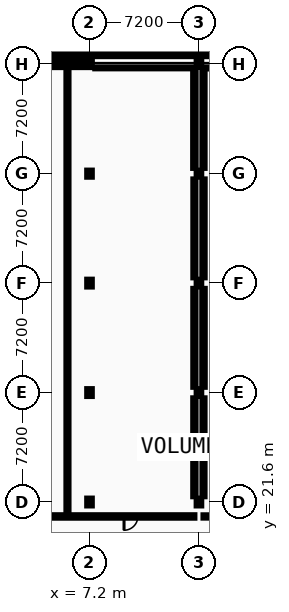
"""IFC4 building model, lengths in metres.
Left out: names, types, materials, properties, quantities, classifications, styles, units other than length and angle.
Written with IfcOpenShell. Run it as: python <this file> out.ifc"""

import sys

from ifc_helpers import new_model, si_unit, direction, frame, frame_2d, origin, origin_2d, place, context, subcontext, project, spatial, rectangle, i_section, extrude, element, fill, save


model = new_model("IFC4")
c1 = context("Model", 3, precision=1e-05, world=origin(), true_north=direction((0.0, 1.0)))
c2 = subcontext(c1, "Body", "Model", "MODEL_VIEW")
j1 = project(units=[si_unit("LENGTHUNIT", "METRE"), si_unit("PLANEANGLEUNIT", "RADIAN")], contexts=[c1])
p1 = place(None, origin())
s1 = spatial("IfcSite", under=j1, at=p1, CompositionType="ELEMENT")
p2 = place(p1, origin())
s2 = spatial("IfcBuilding", under=s1, at=p2, CompositionType="ELEMENT")
p3 = place(p2, frame((0.0, 0.0, 9.6)))
s3 = spatial("IfcBuildingStorey", under=s2, at=p3, CompositionType="ELEMENT", Elevation=9.6)
for number, where, z_axis, x_axis in (
    (1, (7.2, 21.6, 0.0), (0.0, 0.0, 1.0), (1.0, 0.0, 0.0)),
    (2, (7.2, 28.8, 0.0), (0.0, 0.0, 1.0), (1.0, 0.0, 0.0)),
    (3, (7.2, 36.0, 0.0), (0.0, 0.0, 1.0), (1.0, 0.0, 0.0)),
):
    element("IfcColumn", number, at=place(p3, frame(where, z_axis=z_axis, x_axis=x_axis)), inside=s3, PredefinedType="COLUMN", context=c2, shape_type="SweptSolid", body=[
        extrude(i_section(OverallWidth=0.3, OverallDepth=0.45, WebThickness=0.014, FlangeThickness=0.026, FilletRadius=0.027, at=origin_2d()), origin(), (0.0, 0.0, 1.0), 4.4),
    ])
p4 = place(p3, frame((7.2, 43.2, 0.0), z_axis=(0.0, 0.0, 1.0), x_axis=(1.0, 0.0, 0.0)))
e4 = element("IfcColumn", 4, at=p4, inside=s3, PredefinedType="COLUMN", context=c2, shape_type="SweptSolid", body=[
    extrude(i_section(OverallWidth=0.3, OverallDepth=0.4, WebThickness=0.013, FlangeThickness=0.024, FilletRadius=0.027, at=origin_2d()), origin(), (0.0, 0.0, 1.0), 4.4),
])
p5 = place(p3, frame((7.2, 50.4, 0.0), z_axis=(0.0, 0.0, 1.0), x_axis=(1.0, 0.0, 0.0)))
e5 = element("IfcColumn", 5, at=p5, inside=s3, PredefinedType="COLUMN", context=c2, shape_type="SweptSolid", body=[
    extrude(i_section(OverallWidth=0.3, OverallDepth=0.36, WebThickness=0.012, FlangeThickness=0.022, FilletRadius=0.027, at=origin_2d()), origin(), (0.0, 0.0, 1.0), 4.4),
])
p6 = place(p3, frame((7.2, 51.12, 0.0), z_axis=(0.0, 0.0, 1.0), x_axis=(1.0, 0.0, 0.0)))
e6 = element("IfcColumn", 6, at=p6, inside=s3, PredefinedType="COLUMN", context=c2, shape_type="SweptSolid", body=[
    extrude(i_section(OverallWidth=0.24, OverallDepth=0.24, WebThickness=0.01, FlangeThickness=0.017, FilletRadius=0.021, at=origin_2d()), origin(), (0.0, 0.0, 1.0), 4.4),
])
for number, where, z_axis, x_axis in (
    (7, (14.4, 21.6, 0.0), (0.0, 0.0, 1.0), (1.0, 0.0, 0.0)),
    (8, (14.4, 28.8, 0.0), (0.0, 0.0, 1.0), (1.0, 0.0, 0.0)),
    (9, (14.4, 36.0, 0.0), (0.0, 0.0, 1.0), (1.0, 0.0, 0.0)),
):
    element("IfcColumn", number, at=place(p3, frame(where, z_axis=z_axis, x_axis=x_axis)), inside=s3, PredefinedType="COLUMN", context=c2, shape_type="SweptSolid", body=[
        extrude(i_section(OverallWidth=0.3, OverallDepth=0.45, WebThickness=0.014, FlangeThickness=0.026, FilletRadius=0.027, at=origin_2d()), origin(), (0.0, 0.0, 1.0), 4.4),
    ])
p7 = place(p3, frame((14.4, 43.2, 0.0), z_axis=(0.0, 0.0, 1.0), x_axis=(1.0, 0.0, 0.0)))
e10 = element("IfcColumn", 10, at=p7, inside=s3, PredefinedType="COLUMN", context=c2, shape_type="SweptSolid", body=[
    extrude(i_section(OverallWidth=0.3, OverallDepth=0.4, WebThickness=0.013, FlangeThickness=0.024, FilletRadius=0.027, at=origin_2d()), origin(), (0.0, 0.0, 1.0), 4.4),
])
p8 = place(p3, frame((14.4, 50.4, 0.0), z_axis=(0.0, 0.0, 1.0), x_axis=(1.0, 0.0, 0.0)))
e11 = element("IfcColumn", 11, at=p8, inside=s3, PredefinedType="COLUMN", context=c2, shape_type="SweptSolid", body=[
    extrude(i_section(OverallWidth=0.3, OverallDepth=0.36, WebThickness=0.012, FlangeThickness=0.022, FilletRadius=0.027, at=origin_2d()), origin(), (0.0, 0.0, 1.0), 4.4),
])
p9 = place(p3, frame((14.4, 51.12, 0.0), z_axis=(0.0, 0.0, 1.0), x_axis=(1.0, 0.0, 0.0)))
e12 = element("IfcColumn", 12, at=p9, inside=s3, PredefinedType="COLUMN", context=c2, shape_type="SweptSolid", body=[
    extrude(i_section(OverallWidth=0.24, OverallDepth=0.24, WebThickness=0.01, FlangeThickness=0.017, FilletRadius=0.021, at=origin_2d()), origin(), (0.0, 0.0, 1.0), 4.4),
])
p10 = place(p3, frame((7.31, 50.4, 0.0), z_axis=(0.0, 0.0, 1.0), x_axis=(-1.0, 0.0, 0.0)))
e13 = element("IfcWall", 13, at=p10, inside=s3, PredefinedType="STANDARD", context=c2, shape_type="SweptSolid", body=[
    extrude(rectangle(XDim=7.5, YDim=0.38, at=frame_2d((3.75, 0.0))), origin(), (0.0, 0.0, 1.0), 3.895),
])
p11 = place(p10, frame((4.65, 0.0, 0.95)))
e14 = element("IfcOpeningElement", 14, at=p11, cuts=e13, PredefinedType="OPENING", context=c2, shape_type="SweptSolid", body=[
    extrude(rectangle(XDim=1.2, YDim=1.296, at=frame_2d((0.6, 0.648))), frame((0.0, 0.2, 0.0), z_axis=(0.0, -1.0, 0.0), x_axis=(1.0, 0.0, 0.0)), (0.0, 0.0, 1.0), 0.4),
])
p12 = place(p3, frame((-0.19, 51.12, 0.0), z_axis=(0.0, 0.0, 1.0), x_axis=(1.0, 0.0, 0.0)))
e15 = element("IfcWall", 15, at=p12, inside=s3, PredefinedType="STANDARD", context=c2, shape_type="SweptSolid", body=[
    extrude(rectangle(XDim=7.39, YDim=0.38, at=frame_2d((3.695, 0.0))), origin(), (0.0, 0.0, 1.0), 3.875),
])
p13 = place(p12, frame((1.668, 0.0, 0.95)))
e16 = element("IfcOpeningElement", 16, at=p13, cuts=e15, PredefinedType="OPENING", context=c2, shape_type="SweptSolid", body=[
    extrude(rectangle(XDim=1.098, YDim=1.26, at=frame_2d((0.549, 0.63))), frame((0.0, 0.2, 0.0), z_axis=(0.0, -1.0, 0.0), x_axis=(1.0, 0.0, 0.0)), (0.0, 0.0, 1.0), 0.4),
])
p14 = place(p12, frame((4.624, 0.0, 0.95)))
e17 = element("IfcOpeningElement", 17, at=p14, cuts=e15, PredefinedType="OPENING", context=c2, shape_type="SweptSolid", body=[
    extrude(rectangle(XDim=1.098, YDim=1.26, at=frame_2d((0.549, 0.63))), frame((0.0, 0.2, 0.0), z_axis=(0.0, -1.0, 0.0), x_axis=(1.0, 0.0, 0.0)), (0.0, 0.0, 1.0), 0.4),
])
p15 = place(p3, frame((7.2, 51.12, 0.0), z_axis=(0.0, 0.0, 1.0), x_axis=(1.0, 0.0, 0.0)))
e18 = element("IfcWall", 18, at=p15, inside=s3, PredefinedType="STANDARD", context=c2, shape_type="SweptSolid", body=[
    extrude(rectangle(XDim=7.2, YDim=0.38, at=frame_2d((3.6, 0.0))), origin(), (0.0, 0.0, 1.0), 3.875),
])
p16 = place(p15, frame((4.474, 0.0, 0.95)))
e19 = element("IfcOpeningElement", 19, at=p16, cuts=e18, PredefinedType="OPENING", context=c2, shape_type="SweptSolid", body=[
    extrude(rectangle(XDim=1.132, YDim=1.26, at=frame_2d((0.566, 0.63))), frame((0.0, 0.2, 0.0), z_axis=(0.0, -1.0, 0.0), x_axis=(1.0, 0.0, 0.0)), (0.0, 0.0, 1.0), 0.4),
])
p17 = place(p3, frame((14.4, 51.12, 0.0), z_axis=(0.0, 0.0, 1.0), x_axis=(1.0, 0.0, 0.0)))
e20 = element("IfcWall", 20, at=p17, inside=s3, PredefinedType="STANDARD", context=c2, shape_type="SweptSolid", body=[
    extrude(rectangle(XDim=7.2, YDim=0.38, at=frame_2d((3.6, 0.0))), origin(), (0.0, 0.0, 1.0), 3.875),
])
p18 = place(p17, frame((1.577, 0.0, 0.95)))
e21 = element("IfcOpeningElement", 21, at=p18, cuts=e20, PredefinedType="OPENING", context=c2, shape_type="SweptSolid", body=[
    extrude(rectangle(XDim=1.166, YDim=1.26, at=frame_2d((0.583, 0.63))), frame((0.0, 0.2, 0.0), z_axis=(0.0, -1.0, 0.0), x_axis=(1.0, 0.0, 0.0)), (0.0, 0.0, 1.0), 0.4),
])
p19 = place(p3, frame((0.2, 20.65, 0.0), z_axis=(0.0, 0.0, 1.0), x_axis=(1.0, 0.0, 0.0)))
e22 = element("IfcWall", 22, at=p19, inside=s3, PredefinedType="PARTITIONING", context=c2, shape_type="SweptSolid", body=[
    extrude(rectangle(XDim=13.9, YDim=0.16, at=frame_2d((6.95, 0.0))), origin(), (0.0, 0.0, 1.0), 4.2),
])
p20 = place(p19, frame((2.025, 0.0, 0.0)))
e23 = element("IfcOpeningElement", 23, at=p20, cuts=e22, PredefinedType="OPENING", context=c2, shape_type="SweptSolid", body=[
    extrude(rectangle(XDim=1.5, YDim=2.2, at=frame_2d((0.75, 1.1))), frame((0.0, 0.09, 0.0), z_axis=(0.0, -1.0, 0.0), x_axis=(1.0, 0.0, 0.0)), (0.0, 0.0, 1.0), 0.18),
])
p21 = place(p19, frame((9.272, 0.0, 0.0)))
e24 = element("IfcOpeningElement", 24, at=p21, cuts=e22, PredefinedType="OPENING", context=c2, shape_type="SweptSolid", body=[
    extrude(rectangle(XDim=0.906, YDim=2.152, at=frame_2d((0.453, 1.076))), frame((0.0, 0.09, 0.0), z_axis=(0.0, -1.0, 0.0), x_axis=(1.0, 0.0, 0.0)), (0.0, 0.0, 1.0), 0.18),
])
p22 = place(p3, frame((14.7, 20.65, 0.0), z_axis=(0.0, 0.0, 1.0), x_axis=(1.0, 0.0, 0.0)))
e25 = element("IfcWall", 25, at=p22, inside=s3, PredefinedType="PARTITIONING", context=c2, shape_type="SweptSolid", body=[
    extrude(rectangle(XDim=13.9, YDim=0.15, at=frame_2d((6.95, 0.0))), origin(), (0.0, 0.0, 1.0), 4.2),
])
p23 = place(p22, frame((10.81, 0.0, 0.0)))
e26 = element("IfcOpeningElement", 26, at=p23, cuts=e25, PredefinedType="OPENING", context=c2, shape_type="SweptSolid", body=[
    extrude(rectangle(XDim=0.88, YDim=2.152, at=frame_2d((0.44, 1.076))), frame((0.0, 0.085, 0.0), z_axis=(0.0, -1.0, 0.0), x_axis=(1.0, 0.0, 0.0)), (0.0, 0.0, 1.0), 0.17),
])
p24 = place(p22, frame((3.55, 0.0, 0.0)))
e27 = element("IfcOpeningElement", 27, at=p24, cuts=e25, PredefinedType="OPENING", context=c2, shape_type="SweptSolid", body=[
    extrude(rectangle(XDim=1.5, YDim=2.2, at=frame_2d((0.75, 1.1))), frame((0.0, 0.085, 0.0), z_axis=(0.0, -1.0, 0.0), x_axis=(1.0, 0.0, 0.0)), (0.0, 0.0, 1.0), 0.17),
])
p25 = place(p3, frame((7.58, 50.2, 0.0), z_axis=(0.0, 0.0, 1.0), x_axis=(1.0, 0.0, 0.0)))
e28 = element("IfcWall", 28, at=p25, inside=s3, PredefinedType="PARTITIONING", context=c2, shape_type="SweptSolid", body=[
    extrude(rectangle(XDim=6.44, YDim=0.142, at=frame_2d((3.22, 0.0))), origin(), (0.0, 0.0, 1.0), 3.895),
])
p26 = place(p3, frame((14.78, 50.2, 0.0), z_axis=(0.0, 0.0, 1.0), x_axis=(1.0, 0.0, 0.0)))
e29 = element("IfcWall", 29, at=p26, inside=s3, PredefinedType="PARTITIONING", context=c2, shape_type="SweptSolid", body=[
    extrude(rectangle(XDim=6.44, YDim=0.16, at=frame_2d((3.22, 0.0))), origin(), (0.0, 0.0, 1.0), 3.895),
])
p27 = place(p3, frame((5.75, 20.73, 0.0), z_axis=(0.0, 0.0, 1.0), x_axis=(0.0, 1.0, 0.0)))
e30 = element("IfcWall", 30, at=p27, inside=s3, PredefinedType="PARTITIONING", context=c2, shape_type="SweptSolid", body=[
    extrude(rectangle(XDim=29.47, YDim=0.135, at=frame_2d((14.735, 0.0))), origin(), (0.0, 0.0, 1.0), 4.2),
])
p28 = place(p3, frame((14.1, 21.98, 0.0), z_axis=(0.0, 0.0, 1.0), x_axis=(0.0, 1.0, 0.0)))
e31 = element("IfcWall", 31, at=p28, inside=s3, PredefinedType="PARTITIONING", context=c2, shape_type="SweptSolid", body=[
    extrude(rectangle(XDim=6.44, YDim=0.15, at=frame_2d((3.22, 0.0))), origin(), (0.0, 0.0, 1.0), 3.895),
])
p29 = place(p3, frame((14.1, 29.18, 0.0), z_axis=(0.0, 0.0, 1.0), x_axis=(0.0, 1.0, 0.0)))
e32 = element("IfcWall", 32, at=p29, inside=s3, PredefinedType="PARTITIONING", context=c2, shape_type="SweptSolid", body=[
    extrude(rectangle(XDim=6.44, YDim=0.142, at=frame_2d((3.22, 0.0))), origin(), (0.0, 0.0, 1.0), 3.895),
])
p30 = place(p3, frame((14.1, 36.38, 0.0), z_axis=(0.0, 0.0, 1.0), x_axis=(0.0, 1.0, 0.0)))
e33 = element("IfcWall", 33, at=p30, inside=s3, PredefinedType="PARTITIONING", context=c2, shape_type="SweptSolid", body=[
    extrude(rectangle(XDim=6.44, YDim=0.135, at=frame_2d((3.22, 0.0))), origin(), (0.0, 0.0, 1.0), 4.2),
])
p31 = place(p3, frame((14.1, 43.58, 0.0), z_axis=(0.0, 0.0, 1.0), x_axis=(0.0, 1.0, 0.0)))
e34 = element("IfcWall", 34, at=p31, inside=s3, PredefinedType="PARTITIONING", context=c2, shape_type="SweptSolid", body=[
    extrude(rectangle(XDim=6.44, YDim=0.16, at=frame_2d((3.22, 0.0))), origin(), (0.0, 0.0, 1.0), 3.895),
])
p32 = place(p3, frame((14.7, 21.98, 0.0), z_axis=(0.0, 0.0, 1.0), x_axis=(0.0, 1.0, 0.0)))
e35 = element("IfcWall", 35, at=p32, inside=s3, PredefinedType="PARTITIONING", context=c2, shape_type="SweptSolid", body=[
    extrude(rectangle(XDim=6.44, YDim=0.135, at=frame_2d((3.22, 0.0))), origin(), (0.0, 0.0, 1.0), 4.2),
])
p33 = place(p3, frame((14.7, 29.18, 0.0), z_axis=(0.0, 0.0, 1.0), x_axis=(0.0, 1.0, 0.0)))
e36 = element("IfcWall", 36, at=p33, inside=s3, PredefinedType="PARTITIONING", context=c2, shape_type="SweptSolid", body=[
    extrude(rectangle(XDim=6.44, YDim=0.16, at=frame_2d((3.22, 0.0))), origin(), (0.0, 0.0, 1.0), 3.895),
])
p34 = place(p3, frame((14.7, 36.38, 0.0), z_axis=(0.0, 0.0, 1.0), x_axis=(0.0, 1.0, 0.0)))
e37 = element("IfcWall", 37, at=p34, inside=s3, PredefinedType="PARTITIONING", context=c2, shape_type="SweptSolid", body=[
    extrude(rectangle(XDim=6.44, YDim=0.15, at=frame_2d((3.22, 0.0))), origin(), (0.0, 0.0, 1.0), 3.895),
])
p35 = place(p3, frame((14.7, 43.58, 0.0), z_axis=(0.0, 0.0, 1.0), x_axis=(0.0, 1.0, 0.0)))
e38 = element("IfcWall", 38, at=p35, inside=s3, PredefinedType="PARTITIONING", context=c2, shape_type="SweptSolid", body=[
    extrude(rectangle(XDim=6.44, YDim=0.142, at=frame_2d((3.22, 0.0))), origin(), (0.0, 0.0, 1.0), 3.895),
])
p36 = place(p14, origin())
e39 = element("IfcWindow", 39, at=p36, inside=s3, PartitioningType="SINGLE_PANEL", PredefinedType="WINDOW", context=c2, shape_type="SweptSolid", body=[
    extrude(rectangle(XDim=1.098, YDim=1.26, at=frame_2d((0.549, 0.63))), frame((0.0, 0.03, 0.0), z_axis=(0.0, -1.0, 0.0), x_axis=(1.0, 0.0, 0.0)), (0.0, 0.0, 1.0), 0.06),
])
fill(e17, e39)
p37 = place(p16, origin())
e40 = element("IfcWindow", 40, at=p37, inside=s3, PartitioningType="SINGLE_PANEL", PredefinedType="WINDOW", context=c2, shape_type="SweptSolid", body=[
    extrude(rectangle(XDim=1.132, YDim=1.26, at=frame_2d((0.566, 0.63))), frame((0.0, 0.03, 0.0), z_axis=(0.0, -1.0, 0.0), x_axis=(1.0, 0.0, 0.0)), (0.0, 0.0, 1.0), 0.06),
])
fill(e19, e40)
p38 = place(p21, frame((0.906, 0.0, 0.0), z_axis=(0.0, 0.0, 1.0), x_axis=(-1.0, 0.0, 0.0)))
e41 = element("IfcDoor", 41, at=p38, inside=s3, OperationType="SINGLE_SWING_LEFT", PredefinedType="DOOR", context=c2, shape_type="SweptSolid", body=[
    extrude(rectangle(XDim=0.906, YDim=2.152, at=frame_2d((0.453, 1.076))), frame((0.0, 0.025, 0.0), z_axis=(0.0, -1.0, 0.0), x_axis=(1.0, 0.0, 0.0)), (0.0, 0.0, 1.0), 0.05),
])
fill(e24, e41)
save(model, sys.argv[1])
